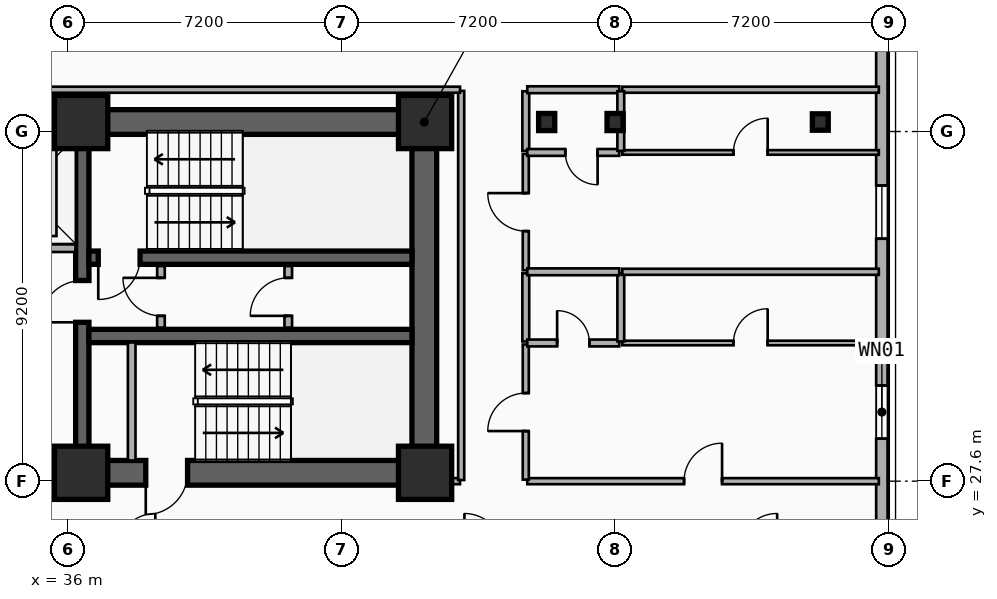
"""IFC4 building model, lengths in metres.
Left out: names, types, materials, properties, quantities, classifications, styles, units other than length and angle.
Written with IfcOpenShell. Run it as: python <this file> out.ifc"""

import sys

from ifc_helpers import new_model, si_unit, direction, frame, frame_2d, origin, origin_2d, place, context, subcontext, project, spatial, rectangle, i_section, extrude, element, fill, save


model = new_model("IFC4")
c1 = context("Model", 3, precision=1e-05, world=origin(), true_north=direction((0.0, 1.0)))
c2 = subcontext(c1, "Body", "Model", "MODEL_VIEW")
j1 = project(units=[si_unit("LENGTHUNIT", "METRE"), si_unit("PLANEANGLEUNIT", "RADIAN")], contexts=[c1])
p1 = place(None, origin())
s1 = spatial("IfcSite", under=j1, at=p1, CompositionType="ELEMENT")
p2 = place(p1, origin())
s2 = spatial("IfcBuilding", under=s1, at=p2, CompositionType="ELEMENT")
p3 = place(p2, frame((0.0, 0.0, 79.3)))
s3 = spatial("IfcBuildingStorey", under=s2, at=p3, CompositionType="ELEMENT", Elevation=79.3)
p4 = place(p3, frame((12.15, 37.05, 0.0), z_axis=(0.0, 0.0, 1.0), x_axis=(1.0, 0.0, 0.0)))
e1 = element("IfcWall", 1, at=p4, inside=s3, PredefinedType="SHEAR", context=c2, shape_type="SweptSolid", body=[
    extrude(rectangle(XDim=33.23, YDim=0.65, at=frame_2d((16.615, 0.0))), origin(), (0.0, 0.0, 1.0), 3.5),
])
p5 = place(p3, frame((45.38, 27.82, 0.0), z_axis=(0.0, 0.0, 1.0), x_axis=(-1.0, 0.0, 0.0)))
e2 = element("IfcWall", 2, at=p5, inside=s3, PredefinedType="SHEAR", context=c2, shape_type="SweptSolid", body=[
    extrude(rectangle(XDim=12.23, YDim=0.65, at=frame_2d((6.115, 0.0))), origin(), (0.0, 0.0, 1.0), 3.5),
])
p6 = place(p5, frame((9.93, 0.0, 0.0)))
e3 = element("IfcOpeningElement", 3, at=p6, cuts=e2, PredefinedType="OPENING", context=c2, shape_type="SweptSolid", body=[
    extrude(rectangle(XDim=1.1, YDim=2.15, at=frame_2d((0.55, 1.075))), frame((0.0, 0.335, 0.0), z_axis=(0.0, -1.0, 0.0), x_axis=(1.0, 0.0, 0.0)), (0.0, 0.0, 1.0), 0.67),
])
p7 = place(p5, frame((6.23, 0.0, 0.0)))
e4 = element("IfcOpeningElement", 4, at=p7, cuts=e2, PredefinedType="OPENING", context=c2, shape_type="SweptSolid", body=[
    extrude(rectangle(XDim=1.1, YDim=2.15, at=frame_2d((0.55, 1.075))), frame((0.0, 0.335, 0.0), z_axis=(0.0, -1.0, 0.0), x_axis=(1.0, 0.0, 0.0)), (0.0, 0.0, 1.0), 0.67),
])
p8 = place(p3, frame((45.38, 28.145, 0.0), z_axis=(0.0, 0.0, 1.0), x_axis=(0.0, 1.0, 0.0)))
e5 = element("IfcWall", 5, at=p8, inside=s3, PredefinedType="SHEAR", context=c2, shape_type="SweptSolid", body=[
    extrude(rectangle(XDim=8.58, YDim=0.65, at=frame_2d((4.29, 0.0))), origin(), (0.0, 0.0, 1.0), 3.5),
])
p9 = place(p3, frame((36.38, 28.145, 0.0), z_axis=(0.0, 0.0, 1.0), x_axis=(0.0, 1.0, 0.0)))
e6 = element("IfcWall", 6, at=p9, inside=s3, PredefinedType="SHEAR", context=c2, shape_type="SweptSolid", body=[
    extrude(rectangle(XDim=8.58, YDim=0.35, at=frame_2d((4.29, 0.0))), origin(), (0.0, 0.0, 1.0), 3.5),
])
p10 = place(p9, frame((3.635, 0.0, 0.0)))
e7 = element("IfcOpeningElement", 7, at=p10, cuts=e6, PredefinedType="OPENING", context=c2, shape_type="SweptSolid", body=[
    extrude(rectangle(XDim=1.1, YDim=2.15, at=frame_2d((0.55, 1.075))), frame((0.0, 0.185, 0.0), z_axis=(0.0, -1.0, 0.0), x_axis=(1.0, 0.0, 0.0)), (0.0, 0.0, 1.0), 0.37),
])
p11 = place(p3, frame((45.055, 33.48, 0.0), z_axis=(0.0, 0.0, 1.0), x_axis=(-1.0, 0.0, 0.0)))
e8 = element("IfcWall", 8, at=p11, inside=s3, PredefinedType="SHEAR", context=c2, shape_type="SweptSolid", body=[
    extrude(rectangle(XDim=8.5, YDim=0.35, at=frame_2d((4.25, 0.0))), origin(), (0.0, 0.0, 1.0), 3.5),
])
p12 = place(p11, frame((7.155, 0.0, 0.0)))
e9 = element("IfcOpeningElement", 9, at=p12, cuts=e8, PredefinedType="OPENING", context=c2, shape_type="SweptSolid", body=[
    extrude(rectangle(XDim=1.1, YDim=2.15, at=frame_2d((0.55, 1.075))), frame((0.0, 0.185, 0.0), z_axis=(0.0, -1.0, 0.0), x_axis=(1.0, 0.0, 0.0)), (0.0, 0.0, 1.0), 0.37),
])
p13 = place(p3, frame((36.555, 31.42, 0.0), z_axis=(0.0, 0.0, 1.0), x_axis=(1.0, 0.0, 0.0)))
e10 = element("IfcWall", 10, at=p13, inside=s3, PredefinedType="SHEAR", context=c2, shape_type="SweptSolid", body=[
    extrude(rectangle(XDim=8.5, YDim=0.35, at=frame_2d((4.25, 0.0))), origin(), (0.0, 0.0, 1.0), 3.5),
])
for number, where, z_axis, x_axis in (
    (11, (36.35, 27.82, 0.0), (0.0, 0.0, 1.0), (1.0, 0.0, 0.0)),
    (12, (36.35, 37.05, 0.0), (0.0, 0.0, 1.0), (1.0, 0.0, 0.0)),
    (13, (45.4, 27.82, 0.0), (0.0, 0.0, 1.0), (1.0, 0.0, 0.0)),
    (14, (45.4, 37.05, 0.0), (0.0, 0.0, 1.0), (1.0, 0.0, 0.0)),
):
    element("IfcColumn", number, at=place(p3, frame(where, z_axis=z_axis, x_axis=x_axis)), inside=s3, PredefinedType="COLUMN", context=c2, shape_type="SweptSolid", body=[
        extrude(rectangle(XDim=1.4, YDim=1.4, at=origin_2d()), origin(), (0.0, 0.0, 1.0), 3.5),
    ])
for number, where, z_axis, x_axis in (
    (15, (48.6, 37.05, 0.0), (0.0, 0.0, 1.0), (1.0, 0.0, 0.0)),
    (16, (50.4, 37.05, 0.0), (0.0, 0.0, 1.0), (1.0, 0.0, 0.0)),
):
    element("IfcColumn", number, at=place(p3, frame(where, z_axis=z_axis, x_axis=x_axis)), inside=s3, PredefinedType="COLUMN", context=c2, shape_type="SweptSolid", body=[
        extrude(i_section(OverallWidth=0.424, OverallDepth=0.45, WebThickness=0.041, FlangeThickness=0.065, FilletRadius=0.015, at=origin_2d()), origin(), (0.0, 0.0, 1.0), 3.5),
    ])
p14 = place(p3, frame((55.8, 37.05, 0.0), z_axis=(0.0, 0.0, 1.0), x_axis=(1.0, 0.0, 0.0)))
e17 = element("IfcColumn", 17, at=p14, inside=s3, PredefinedType="COLUMN", context=c2, shape_type="SweptSolid", body=[
    extrude(i_section(OverallWidth=0.418, OverallDepth=0.432, WebThickness=0.035, FlangeThickness=0.056, FilletRadius=0.015, at=origin_2d()), origin(), (0.0, 0.0, 1.0), 3.5),
])
p15 = place(p3, frame((57.42, 39.0, 0.0), z_axis=(0.0, 0.0, 1.0), x_axis=(0.0, -1.0, 0.0)))
e18 = element("IfcWall", 18, at=p15, inside=s3, PredefinedType="SOLIDWALL", context=c2, shape_type="SweptSolid", body=[
    extrude(rectangle(XDim=18.0, YDim=0.3, at=frame_2d((9.0, 0.0))), origin(), (0.0, 0.0, 1.0), 3.24),
])
p16 = place(p15, frame((8.882, 0.0, 0.48)))
e19 = element("IfcOpeningElement", 19, at=p16, cuts=e18, PredefinedType="OPENING", context=c2, shape_type="SweptSolid", body=[
    extrude(rectangle(XDim=1.4, YDim=1.8, at=frame_2d((0.7, 0.9))), frame((0.0, 0.16, 0.0), z_axis=(0.0, -1.0, 0.0), x_axis=(1.0, 0.0, 0.0)), (0.0, 0.0, 1.0), 0.32),
])
p17 = place(p15, frame((3.621, 0.0, 0.48)))
e20 = element("IfcOpeningElement", 20, at=p17, cuts=e18, PredefinedType="OPENING", context=c2, shape_type="SweptSolid", body=[
    extrude(rectangle(XDim=1.4, YDim=1.8, at=frame_2d((0.7, 0.9))), frame((0.0, 0.16, 0.0), z_axis=(0.0, -1.0, 0.0), x_axis=(1.0, 0.0, 0.0)), (0.0, 0.0, 1.0), 0.32),
])
p18 = place(p15, frame((16.28, 0.0, 0.65)))
e21 = element("IfcOpeningElement", 21, at=p18, cuts=e18, PredefinedType="OPENING", context=c2, shape_type="SweptSolid", body=[
    extrude(rectangle(XDim=1.4, YDim=1.8, at=frame_2d((0.7, 0.9))), frame((0.0, 0.16, 0.0), z_axis=(0.0, -1.0, 0.0), x_axis=(1.0, 0.0, 0.0)), (0.0, 0.0, 1.0), 0.32),
])
p19 = place(p3, frame((33.475, 33.73, 0.0), z_axis=(0.0, 0.0, 1.0), x_axis=(1.0, 0.0, 0.0)))
e22 = element("IfcWall", 22, at=p19, inside=s3, PredefinedType="PARTITIONING", context=c2, shape_type="SweptSolid", body=[
    extrude(rectangle(XDim=2.725, YDim=0.2, at=frame_2d((1.362, 0.0))), origin(), (0.0, 0.0, 1.0), 2.212),
])
p20 = place(p19, frame((0.812, 0.0, 0.0)))
e23 = element("IfcOpeningElement", 23, at=p20, cuts=e22, PredefinedType="OPENING", context=c2, shape_type="SweptSolid", body=[
    extrude(rectangle(XDim=1.1, YDim=2.15, at=frame_2d((0.55, 1.075))), frame((0.0, 0.11, 0.0), z_axis=(0.0, -1.0, 0.0), x_axis=(1.0, 0.0, 0.0)), (0.0, 0.0, 1.0), 0.22),
])
p21 = place(p3, frame((37.68, 28.145, 0.0), z_axis=(0.0, 0.0, 1.0), x_axis=(0.0, 1.0, 0.0)))
e24 = element("IfcWall", 24, at=p21, inside=s3, PredefinedType="PARTITIONING", context=c2, shape_type="SweptSolid", body=[
    extrude(rectangle(XDim=3.105, YDim=0.2, at=frame_2d((1.552, 0.0))), origin(), (0.0, 0.0, 1.0), 2.62),
])
p22 = place(p3, frame((38.45, 31.64, 0.0), z_axis=(0.0, 0.0, 1.0), x_axis=(0.0, 1.0, 0.0)))
e25 = element("IfcWall", 25, at=p22, inside=s3, PredefinedType="PARTITIONING", context=c2, shape_type="SweptSolid", body=[
    extrude(rectangle(XDim=1.62, YDim=0.2, at=frame_2d((0.81, 0.0))), origin(), (0.0, 0.0, 1.0), 3.24),
])
p23 = place(p22, frame((0.31, 0.0, 0.0)))
e26 = element("IfcOpeningElement", 26, at=p23, cuts=e25, PredefinedType="OPENING", context=c2, shape_type="SweptSolid", body=[
    extrude(rectangle(XDim=1.0, YDim=2.15, at=frame_2d((0.5, 1.075))), frame((0.0, 0.11, 0.0), z_axis=(0.0, -1.0, 0.0), x_axis=(1.0, 0.0, 0.0)), (0.0, 0.0, 1.0), 0.22),
])
p24 = place(p3, frame((41.8, 31.64, 0.0), z_axis=(0.0, 0.0, 1.0), x_axis=(0.0, 1.0, 0.0)))
e27 = element("IfcWall", 27, at=p24, inside=s3, PredefinedType="PARTITIONING", context=c2, shape_type="SweptSolid", body=[
    extrude(rectangle(XDim=1.62, YDim=0.2, at=frame_2d((0.81, 0.0))), origin(), (0.0, 0.0, 1.0), 3.24),
])
p25 = place(p24, frame((0.31, 0.0, 0.0)))
e28 = element("IfcOpeningElement", 28, at=p25, cuts=e27, PredefinedType="OPENING", context=c2, shape_type="SweptSolid", body=[
    extrude(rectangle(XDim=1.0, YDim=2.15, at=frame_2d((0.5, 1.075))), frame((0.0, 0.11, 0.0), z_axis=(0.0, -1.0, 0.0), x_axis=(1.0, 0.0, 0.0)), (0.0, 0.0, 1.0), 0.22),
])
p26 = place(p3, frame((48.09, 27.6, 0.0), z_axis=(0.0, 0.0, 1.0), x_axis=(1.0, 0.0, 0.0)))
e29 = element("IfcWall", 29, at=p26, inside=s3, PredefinedType="PARTITIONING", context=c2, shape_type="SweptSolid", body=[
    extrude(rectangle(XDim=9.25, YDim=0.16, at=frame_2d((4.625, 0.0))), origin(), (0.0, 0.0, 1.0), 2.57),
])
p27 = place(p26, frame((4.125, 0.0, 0.0)))
e30 = element("IfcOpeningElement", 30, at=p27, cuts=e29, PredefinedType="OPENING", context=c2, shape_type="SweptSolid", body=[
    extrude(rectangle(XDim=1.0, YDim=2.15, at=frame_2d((0.5, 1.075))), frame((0.0, 0.09, 0.0), z_axis=(0.0, -1.0, 0.0), x_axis=(1.0, 0.0, 0.0)), (0.0, 0.0, 1.0), 0.18),
])
p28 = place(p3, frame((48.05, 27.64, 0.0), z_axis=(0.0, 0.0, 1.0), x_axis=(0.0, 1.0, 0.0)))
e31 = element("IfcWall", 31, at=p28, inside=s3, PredefinedType="PARTITIONING", context=c2, shape_type="SweptSolid", body=[
    extrude(rectangle(XDim=3.556, YDim=0.16, at=frame_2d((1.778, 0.0))), origin(), (0.0, 0.0, 1.0), 3.24),
])
p29 = place(p28, frame((1.278, 0.0, 0.0)))
e32 = element("IfcOpeningElement", 32, at=p29, cuts=e31, PredefinedType="OPENING", context=c2, shape_type="SweptSolid", body=[
    extrude(rectangle(XDim=1.0, YDim=2.15, at=frame_2d((0.5, 1.075))), frame((0.0, 0.09, 0.0), z_axis=(0.0, -1.0, 0.0), x_axis=(1.0, 0.0, 0.0)), (0.0, 0.0, 1.0), 0.18),
])
p30 = place(p3, frame((48.05, 31.276, 0.0), z_axis=(0.0, 0.0, 1.0), x_axis=(0.0, 1.0, 0.0)))
e33 = element("IfcWall", 33, at=p30, inside=s3, PredefinedType="PLUMBINGWALL", context=c2, shape_type="SweptSolid", body=[
    extrude(rectangle(XDim=1.793, YDim=0.18, at=frame_2d((0.896, 0.0))), origin(), (0.0, 0.0, 1.0), 3.24),
])
p31 = place(p3, frame((48.05, 33.149, 0.0), z_axis=(0.0, 0.0, 1.0), x_axis=(0.0, 1.0, 0.0)))
e34 = element("IfcWall", 34, at=p31, inside=s3, PredefinedType="PARTITIONING", context=c2, shape_type="SweptSolid", body=[
    extrude(rectangle(XDim=3.061, YDim=0.16, at=frame_2d((1.531, 0.0))), origin(), (0.0, 0.0, 1.0), 3.24),
])
p32 = place(p31, frame((1.031, 0.0, 0.0)))
e35 = element("IfcOpeningElement", 35, at=p32, cuts=e34, PredefinedType="OPENING", context=c2, shape_type="SweptSolid", body=[
    extrude(rectangle(XDim=1.0, YDim=2.15, at=frame_2d((0.5, 1.075))), frame((0.0, 0.09, 0.0), z_axis=(0.0, -1.0, 0.0), x_axis=(1.0, 0.0, 0.0)), (0.0, 0.0, 1.0), 0.18),
])
p33 = place(p3, frame((48.05, 36.29, 0.0), z_axis=(0.0, 0.0, 1.0), x_axis=(0.0, 1.0, 0.0)))
e36 = element("IfcWall", 36, at=p33, inside=s3, PredefinedType="PLUMBINGWALL", context=c2, shape_type="SweptSolid", body=[
    extrude(rectangle(XDim=1.57, YDim=0.18, at=frame_2d((0.785, 0.0))), origin(), (0.0, 0.0, 1.0), 2.72),
])
p34 = place(p3, frame((48.09, 37.9, 0.0), z_axis=(0.0, 0.0, 1.0), x_axis=(1.0, 0.0, 0.0)))
e37 = element("IfcWall", 37, at=p34, inside=s3, PredefinedType="PLUMBINGWALL", context=c2, shape_type="SweptSolid", body=[
    extrude(rectangle(XDim=2.42, YDim=0.18, at=frame_2d((1.21, 0.0))), origin(), (0.0, 0.0, 1.0), 3.24),
])
p35 = place(p3, frame((50.59, 37.9, 0.0), z_axis=(0.0, 0.0, 1.0), x_axis=(1.0, 0.0, 0.0)))
e38 = element("IfcWall", 38, at=p35, inside=s3, PredefinedType="PARTITIONING", context=c2, shape_type="SweptSolid", body=[
    extrude(rectangle(XDim=6.75, YDim=0.16, at=frame_2d((3.375, 0.0))), origin(), (0.0, 0.0, 1.0), 3.24),
])
p36 = place(p3, frame((48.09, 31.236, 0.0), z_axis=(0.0, 0.0, 1.0), x_axis=(1.0, 0.0, 0.0)))
e39 = element("IfcWall", 39, at=p36, inside=s3, PredefinedType="PLUMBINGWALL", context=c2, shape_type="SweptSolid", body=[
    extrude(rectangle(XDim=2.42, YDim=0.18, at=frame_2d((1.21, 0.0))), origin(), (0.0, 0.0, 1.0), 2.57),
])
p37 = place(p36, frame((0.785, 0.0, 0.0)))
e40 = element("IfcOpeningElement", 40, at=p37, cuts=e39, PredefinedType="OPENING", context=c2, shape_type="SweptSolid", body=[
    extrude(rectangle(XDim=0.85, YDim=2.1, at=frame_2d((0.425, 1.05))), frame((0.0, 0.1, 0.0), z_axis=(0.0, -1.0, 0.0), x_axis=(1.0, 0.0, 0.0)), (0.0, 0.0, 1.0), 0.2),
])
p38 = place(p3, frame((50.59, 31.236, 0.0), z_axis=(0.0, 0.0, 1.0), x_axis=(1.0, 0.0, 0.0)))
e41 = element("IfcWall", 41, at=p38, inside=s3, PredefinedType="PARTITIONING", context=c2, shape_type="SweptSolid", body=[
    extrude(rectangle(XDim=6.75, YDim=0.12, at=frame_2d((3.375, 0.0))), origin(), (0.0, 0.0, 1.0), 2.57),
])
p39 = place(p38, frame((2.925, 0.0, 0.0)))
e42 = element("IfcOpeningElement", 42, at=p39, cuts=e41, PredefinedType="OPENING", context=c2, shape_type="SweptSolid", body=[
    extrude(rectangle(XDim=0.9, YDim=2.1, at=frame_2d((0.45, 1.05))), frame((0.0, 0.07, 0.0), z_axis=(0.0, -1.0, 0.0), x_axis=(1.0, 0.0, 0.0)), (0.0, 0.0, 1.0), 0.14),
])
p40 = place(p3, frame((50.55, 31.276, 0.0), z_axis=(0.0, 0.0, 1.0), x_axis=(0.0, 1.0, 0.0)))
e43 = element("IfcWall", 43, at=p40, inside=s3, PredefinedType="PLUMBINGWALL", context=c2, shape_type="SweptSolid", body=[
    extrude(rectangle(XDim=1.793, YDim=0.18, at=frame_2d((0.896, 0.0))), origin(), (0.0, 0.0, 1.0), 2.57),
])
p41 = place(p3, frame((48.09, 33.109, 0.0), z_axis=(0.0, 0.0, 1.0), x_axis=(1.0, 0.0, 0.0)))
e44 = element("IfcWall", 44, at=p41, inside=s3, PredefinedType="PLUMBINGWALL", context=c2, shape_type="SweptSolid", body=[
    extrude(rectangle(XDim=2.42, YDim=0.18, at=frame_2d((1.21, 0.0))), origin(), (0.0, 0.0, 1.0), 2.57),
])
p42 = place(p3, frame((50.59, 33.109, 0.0), z_axis=(0.0, 0.0, 1.0), x_axis=(1.0, 0.0, 0.0)))
e45 = element("IfcWall", 45, at=p42, inside=s3, PredefinedType="PARTITIONING", context=c2, shape_type="SweptSolid", body=[
    extrude(rectangle(XDim=6.75, YDim=0.16, at=frame_2d((3.375, 0.0))), origin(), (0.0, 0.0, 1.0), 2.57),
])
p43 = place(p3, frame((50.51, 36.25, 0.0), z_axis=(0.0, 0.0, 1.0), x_axis=(-1.0, 0.0, 0.0)))
e46 = element("IfcWall", 46, at=p43, inside=s3, PredefinedType="PLUMBINGWALL", context=c2, shape_type="SweptSolid", body=[
    extrude(rectangle(XDim=2.42, YDim=0.18, at=frame_2d((1.21, 0.0))), origin(), (0.0, 0.0, 1.0), 2.57),
])
p44 = place(p43, frame((0.57, 0.0, 0.0)))
e47 = element("IfcOpeningElement", 47, at=p44, cuts=e46, PredefinedType="OPENING", context=c2, shape_type="SweptSolid", body=[
    extrude(rectangle(XDim=0.85, YDim=2.1, at=frame_2d((0.425, 1.05))), frame((0.0, 0.1, 0.0), z_axis=(0.0, -1.0, 0.0), x_axis=(1.0, 0.0, 0.0)), (0.0, 0.0, 1.0), 0.2),
])
p45 = place(p3, frame((50.59, 36.25, 0.0), z_axis=(0.0, 0.0, 1.0), x_axis=(1.0, 0.0, 0.0)))
e48 = element("IfcWall", 48, at=p45, inside=s3, PredefinedType="PARTITIONING", context=c2, shape_type="SweptSolid", body=[
    extrude(rectangle(XDim=6.75, YDim=0.12, at=frame_2d((3.375, 0.0))), origin(), (0.0, 0.0, 1.0), 2.57),
])
p46 = place(p45, frame((2.925, 0.0, 0.0)))
e49 = element("IfcOpeningElement", 49, at=p46, cuts=e48, PredefinedType="OPENING", context=c2, shape_type="SweptSolid", body=[
    extrude(rectangle(XDim=0.9, YDim=2.1, at=frame_2d((0.45, 1.05))), frame((0.0, 0.07, 0.0), z_axis=(0.0, -1.0, 0.0), x_axis=(1.0, 0.0, 0.0)), (0.0, 0.0, 1.0), 0.14),
])
p47 = place(p3, frame((50.55, 36.29, 0.0), z_axis=(0.0, 0.0, 1.0), x_axis=(0.0, 1.0, 0.0)))
e50 = element("IfcWall", 50, at=p47, inside=s3, PredefinedType="PLUMBINGWALL", context=c2, shape_type="SweptSolid", body=[
    extrude(rectangle(XDim=1.57, YDim=0.18, at=frame_2d((0.785, 0.0))), origin(), (0.0, 0.0, 1.0), 2.57),
])
p48 = place(p3, frame((45.41, 27.6, 0.0), z_axis=(0.0, 0.0, 1.0), x_axis=(1.0, 0.0, 0.0)))
e51 = element("IfcWall", 51, at=p48, inside=s3, PredefinedType="PARTITIONING", context=c2, shape_type="SweptSolid", body=[
    extrude(rectangle(XDim=0.91, YDim=0.16, at=frame_2d((0.455, 0.0))), origin(), (0.0, 0.0, 1.0), 2.28),
])
p49 = place(p3, frame((46.35, 27.63, 0.0), z_axis=(0.0, 0.0, 1.0), x_axis=(0.0, 1.0, 0.0)))
e52 = element("IfcWall", 52, at=p49, inside=s3, PredefinedType="PARTITIONING", context=c2, shape_type="SweptSolid", body=[
    extrude(rectangle(XDim=10.24, YDim=0.16, at=frame_2d((5.12, 0.0))), origin(), (0.0, 0.0, 1.0), 2.72),
])
p50 = place(p3, frame((11.28, 37.9, 0.0), z_axis=(0.0, 0.0, 1.0), x_axis=(1.0, 0.0, 0.0)))
e53 = element("IfcWall", 53, at=p50, inside=s3, PredefinedType="PARTITIONING", context=c2, shape_type="SweptSolid", body=[
    extrude(rectangle(XDim=35.04, YDim=0.16, at=frame_2d((17.52, 0.0))), origin(), (0.0, 0.0, 1.0), 3.24),
])
p51 = place(p16, origin())
e54 = element("IfcWindow", 54, at=p51, inside=s3, PartitioningType="SINGLE_PANEL", PredefinedType="WINDOW", context=c2, shape_type="SweptSolid", body=[
    extrude(rectangle(XDim=1.4, YDim=1.8, at=frame_2d((0.7, 0.9))), frame((0.0, 0.03, 0.0), z_axis=(0.0, -1.0, 0.0), x_axis=(1.0, 0.0, 0.0)), (0.0, 0.0, 1.0), 0.06),
])
fill(e19, e54)
p52 = place(p17, origin())
e55 = element("IfcWindow", 55, at=p52, inside=s3, PartitioningType="SINGLE_PANEL", PredefinedType="WINDOW", context=c2, shape_type="SweptSolid", body=[
    extrude(rectangle(XDim=1.4, YDim=1.8, at=frame_2d((0.7, 0.9))), frame((0.0, 0.03, 0.0), z_axis=(0.0, -1.0, 0.0), x_axis=(1.0, 0.0, 0.0)), (0.0, 0.0, 1.0), 0.06),
])
fill(e20, e55)
p53 = place(p12, origin())
e56 = element("IfcDoor", 56, at=p53, inside=s3, OperationType="SINGLE_SWING_RIGHT", PredefinedType="DOOR", context=c2, shape_type="SweptSolid", body=[
    extrude(rectangle(XDim=1.1, YDim=2.15, at=frame_2d((0.55, 1.075))), frame((0.0, 0.025, 0.0), z_axis=(0.0, -1.0, 0.0), x_axis=(1.0, 0.0, 0.0)), (0.0, 0.0, 1.0), 0.05),
])
fill(e9, e56)
p54 = place(p10, origin())
e57 = element("IfcDoor", 57, at=p54, inside=s3, OperationType="SINGLE_SWING_LEFT", PredefinedType="DOOR", context=c2, shape_type="SweptSolid", body=[
    extrude(rectangle(XDim=1.1, YDim=2.15, at=frame_2d((0.55, 1.075))), frame((0.0, 0.025, 0.0), z_axis=(0.0, -1.0, 0.0), x_axis=(1.0, 0.0, 0.0)), (0.0, 0.0, 1.0), 0.05),
])
fill(e7, e57)
p55 = place(p7, origin())
e58 = element("IfcDoor", 58, at=p55, inside=s3, OperationType="SINGLE_SWING_RIGHT", PredefinedType="DOOR", context=c2, shape_type="SweptSolid", body=[
    extrude(rectangle(XDim=1.1, YDim=2.15, at=frame_2d((0.55, 1.075))), frame((0.0, 0.025, 0.0), z_axis=(0.0, -1.0, 0.0), x_axis=(1.0, 0.0, 0.0)), (0.0, 0.0, 1.0), 0.05),
])
fill(e4, e58)
p56 = place(p23, origin())
e59 = element("IfcDoor", 59, at=p56, inside=s3, OperationType="SINGLE_SWING_RIGHT", PredefinedType="DOOR", context=c2, shape_type="SweptSolid", body=[
    extrude(rectangle(XDim=1.0, YDim=2.15, at=frame_2d((0.5, 1.075))), frame((0.0, 0.025, 0.0), z_axis=(0.0, -1.0, 0.0), x_axis=(1.0, 0.0, 0.0)), (0.0, 0.0, 1.0), 0.05),
])
fill(e26, e59)
p57 = place(p25, origin())
e60 = element("IfcDoor", 60, at=p57, inside=s3, OperationType="SINGLE_SWING_LEFT", PredefinedType="DOOR", context=c2, shape_type="SweptSolid", body=[
    extrude(rectangle(XDim=1.0, YDim=2.15, at=frame_2d((0.5, 1.075))), frame((0.0, 0.025, 0.0), z_axis=(0.0, -1.0, 0.0), x_axis=(1.0, 0.0, 0.0)), (0.0, 0.0, 1.0), 0.05),
])
fill(e28, e60)
p58 = place(p27, origin())
e61 = element("IfcDoor", 61, at=p58, inside=s3, OperationType="SINGLE_SWING_RIGHT", PredefinedType="DOOR", context=c2, shape_type="SweptSolid", body=[
    extrude(rectangle(XDim=1.0, YDim=2.15, at=frame_2d((0.5, 1.075))), frame((0.0, 0.025, 0.0), z_axis=(0.0, -1.0, 0.0), x_axis=(1.0, 0.0, 0.0)), (0.0, 0.0, 1.0), 0.05),
])
fill(e30, e61)
p59 = place(p29, origin())
e62 = element("IfcDoor", 62, at=p59, inside=s3, OperationType="SINGLE_SWING_LEFT", PredefinedType="DOOR", context=c2, shape_type="SweptSolid", body=[
    extrude(rectangle(XDim=1.0, YDim=2.15, at=frame_2d((0.5, 1.075))), frame((0.0, 0.025, 0.0), z_axis=(0.0, -1.0, 0.0), x_axis=(1.0, 0.0, 0.0)), (0.0, 0.0, 1.0), 0.05),
])
fill(e32, e62)
p60 = place(p32, origin())
e63 = element("IfcDoor", 63, at=p60, inside=s3, OperationType="SINGLE_SWING_RIGHT", PredefinedType="DOOR", context=c2, shape_type="SweptSolid", body=[
    extrude(rectangle(XDim=1.0, YDim=2.15, at=frame_2d((0.5, 1.075))), frame((0.0, 0.025, 0.0), z_axis=(0.0, -1.0, 0.0), x_axis=(1.0, 0.0, 0.0)), (0.0, 0.0, 1.0), 0.05),
])
fill(e35, e63)
p61 = place(p37, origin())
e64 = element("IfcDoor", 64, at=p61, inside=s3, OperationType="SINGLE_SWING_LEFT", PredefinedType="DOOR", context=c2, shape_type="SweptSolid", body=[
    extrude(rectangle(XDim=0.85, YDim=2.1, at=frame_2d((0.425, 1.05))), frame((0.0, 0.025, 0.0), z_axis=(0.0, -1.0, 0.0), x_axis=(1.0, 0.0, 0.0)), (0.0, 0.0, 1.0), 0.05),
])
fill(e40, e64)
p62 = place(p39, origin())
e65 = element("IfcDoor", 65, at=p62, inside=s3, OperationType="SINGLE_SWING_RIGHT", PredefinedType="DOOR", context=c2, shape_type="SweptSolid", body=[
    extrude(rectangle(XDim=0.9, YDim=2.1, at=frame_2d((0.45, 1.05))), frame((0.0, 0.025, 0.0), z_axis=(0.0, -1.0, 0.0), x_axis=(1.0, 0.0, 0.0)), (0.0, 0.0, 1.0), 0.05),
])
fill(e42, e65)
p63 = place(p44, origin())
e66 = element("IfcDoor", 66, at=p63, inside=s3, OperationType="SINGLE_SWING_LEFT", PredefinedType="DOOR", context=c2, shape_type="SweptSolid", body=[
    extrude(rectangle(XDim=0.85, YDim=2.1, at=frame_2d((0.425, 1.05))), frame((0.0, 0.025, 0.0), z_axis=(0.0, -1.0, 0.0), x_axis=(1.0, 0.0, 0.0)), (0.0, 0.0, 1.0), 0.05),
])
fill(e47, e66)
p64 = place(p46, origin())
e67 = element("IfcDoor", 67, at=p64, inside=s3, OperationType="SINGLE_SWING_RIGHT", PredefinedType="DOOR", context=c2, shape_type="SweptSolid", body=[
    extrude(rectangle(XDim=0.9, YDim=2.1, at=frame_2d((0.45, 1.05))), frame((0.0, 0.025, 0.0), z_axis=(0.0, -1.0, 0.0), x_axis=(1.0, 0.0, 0.0)), (0.0, 0.0, 1.0), 0.05),
])
fill(e49, e67)
save(model, sys.argv[1])
